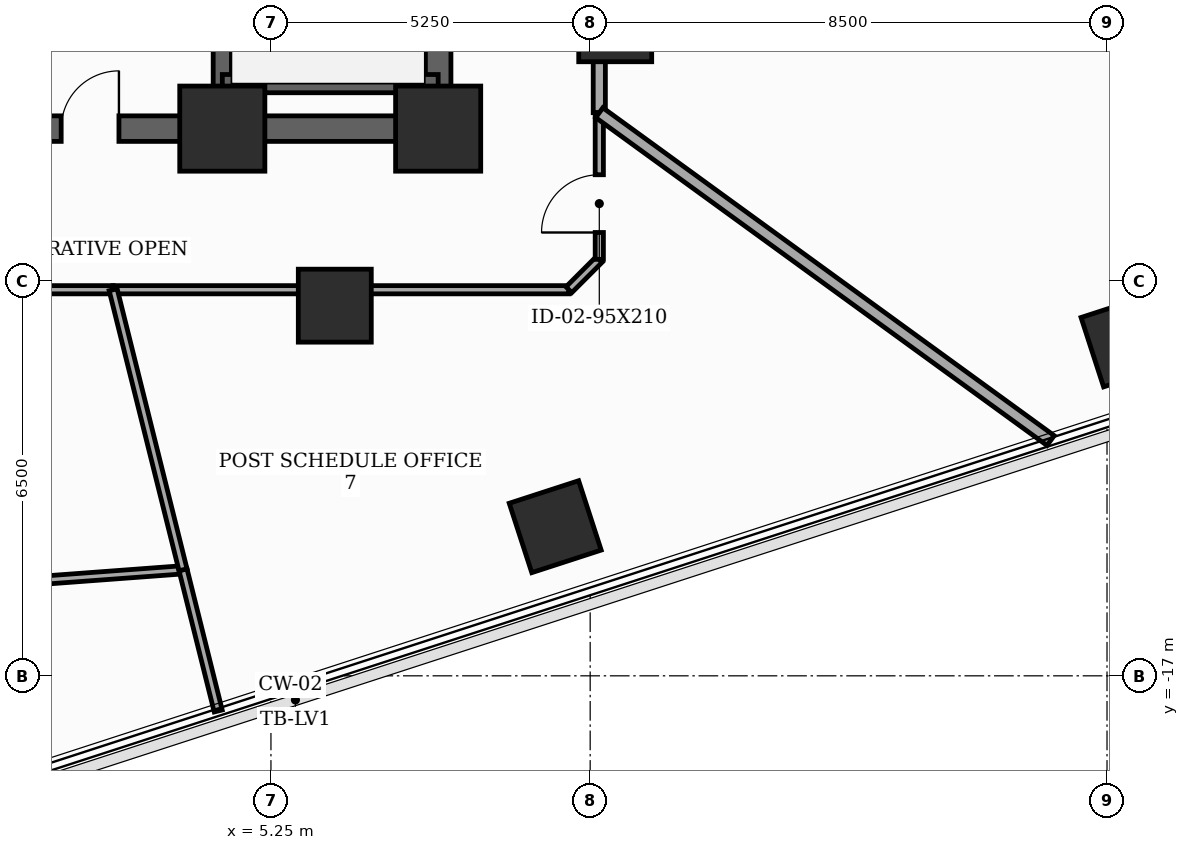
"""IFC4 building model, lengths in metres.
Left out: names, types, materials, properties, quantities, classifications, styles, units other than length and angle.
Written with IfcOpenShell. Run it as: python <this file> out.ifc"""

import sys

from ifc_helpers import new_model, si_unit, direction, frame, frame_2d, origin, origin_2d, place, context, subcontext, project, spatial, rectangle, extrude, element, fill, save


model = new_model("IFC4")
c1 = context("Model", 3, precision=1e-05, world=origin(), true_north=direction((0.0, 1.0)))
c2 = subcontext(c1, "Body", "Model", "MODEL_VIEW")
j1 = project(units=[si_unit("LENGTHUNIT", "METRE"), si_unit("PLANEANGLEUNIT", "RADIAN")], contexts=[c1])
p1 = place(None, origin())
s1 = spatial("IfcSite", under=j1, at=p1, CompositionType="ELEMENT")
p2 = place(p1, origin())
s2 = spatial("IfcBuilding", under=s1, at=p2, CompositionType="ELEMENT")
p3 = place(p2, frame((0.0, 0.0, 97.7)))
s3 = spatial("IfcBuildingStorey", under=s2, at=p3, CompositionType="ELEMENT", Elevation=97.7)
for number, where, z_axis, x_axis in (
    (1, (4.45, -8.0, 0.0), (0.0, 0.0, 1.0), (1.0, 0.0, 0.0)),
    (2, (8.0, -8.0, 0.0), (0.0, 0.0, 1.0), (1.0, 0.0, 0.0)),
):
    element("IfcColumn", number, at=place(p3, frame(where, z_axis=z_axis, x_axis=x_axis)), inside=s3, PredefinedType="COLUMN", context=c2, shape_type="SweptSolid", body=[
        extrude(rectangle(XDim=1.4, YDim=1.4, at=origin_2d()), origin(), (0.0, 0.0, 1.0), 3.7),
    ])
for number, where, z_axis, x_axis in (
    (3, (6.3, -10.912, 0.0), (0.0, 0.0, 1.0), (1.0, 0.0, 0.0)),
    (4, (10.912, -6.3, 0.0), (0.0, 0.0, 1.0), (1.0, 0.0, 0.0)),
    (5, (9.925, -14.547, 0.0), (0.0, 0.0, 1.0), (0.951, 0.309, 0.0)),
    (6, (19.329, -11.491, 0.0), (0.0, 0.0, 1.0), (0.951, 0.309, 0.0)),
):
    element("IfcColumn", number, at=place(p3, frame(where, z_axis=z_axis, x_axis=x_axis)), inside=s3, PredefinedType="COLUMN", context=c2, shape_type="SweptSolid", body=[
        extrude(rectangle(XDim=1.2, YDim=1.2, at=origin_2d()), origin(), (0.0, 0.0, 1.0), 3.7),
    ])
p4 = place(p3, frame((8.0, -8.0, 0.0), z_axis=(0.0, 0.0, 1.0), x_axis=(0.0, 1.0, 0.0)))
e7 = element("IfcWall", 7, at=p4, inside=s3, PredefinedType="SHEAR", context=c2, shape_type="SweptSolid", body=[
    extrude(rectangle(XDim=16.0, YDim=0.42, at=frame_2d((8.0, 0.0))), origin(), (0.0, 0.0, 1.0), 3.5),
])
p5 = place(p4, frame((9.6, 0.0, 0.0)))
e8 = element("IfcOpeningElement", 8, at=p5, cuts=e7, PredefinedType="OPENING", context=c2, shape_type="SweptSolid", body=[
    extrude(rectangle(XDim=1.05, YDim=2.15, at=frame_2d((0.525, 1.075))), frame((0.0, 0.22, 0.0), z_axis=(0.0, -1.0, 0.0), x_axis=(1.0, 0.0, 0.0)), (0.0, 0.0, 1.0), 0.44),
])
p6 = place(p4, frame((14.229, 0.0, 0.0)))
e9 = element("IfcOpeningElement", 9, at=p6, cuts=e7, PredefinedType="OPENING", context=c2, shape_type="SweptSolid", body=[
    extrude(rectangle(XDim=0.85, YDim=2.02, at=frame_2d((0.425, 1.01))), frame((0.0, 0.22, 0.0), z_axis=(0.0, -1.0, 0.0), x_axis=(1.0, 0.0, 0.0)), (0.0, 0.0, 1.0), 0.44),
])
p7 = place(p3, frame((-8.0, -8.0, 0.0), z_axis=(0.0, 0.0, 1.0), x_axis=(1.0, 0.0, 0.0)))
e10 = element("IfcWall", 10, at=p7, inside=s3, PredefinedType="SHEAR", context=c2, shape_type="SweptSolid", body=[
    extrude(rectangle(XDim=16.0, YDim=0.42, at=frame_2d((8.0, 0.0))), origin(), (0.0, 0.0, 1.0), 3.5),
])
p8 = place(p7, frame((5.2, 0.0, 0.0)))
e11 = element("IfcOpeningElement", 11, at=p8, cuts=e10, PredefinedType="OPENING", context=c2, shape_type="SweptSolid", body=[
    extrude(rectangle(XDim=0.95, YDim=2.1, at=frame_2d((0.475, 1.05))), frame((0.0, 0.22, 0.0), z_axis=(0.0, -1.0, 0.0), x_axis=(1.0, 0.0, 0.0)), (0.0, 0.0, 1.0), 0.44),
])
p9 = place(p7, frame((9.8, 0.0, 0.0)))
e12 = element("IfcOpeningElement", 12, at=p9, cuts=e10, PredefinedType="OPENING", context=c2, shape_type="SweptSolid", body=[
    extrude(rectangle(XDim=0.95, YDim=2.1, at=frame_2d((0.475, 1.05))), frame((0.0, 0.22, 0.0), z_axis=(0.0, -1.0, 0.0), x_axis=(1.0, 0.0, 0.0)), (0.0, 0.0, 1.0), 0.44),
])
p10 = place(p3, frame((4.45, -7.79, 0.0), z_axis=(0.0, 0.0, 1.0), x_axis=(0.0, 1.0, 0.0)))
e13 = element("IfcWall", 13, at=p10, inside=s3, PredefinedType="SHEAR", context=c2, shape_type="SweptSolid", body=[
    extrude(rectangle(XDim=15.58, YDim=0.3, at=frame_2d((7.79, 0.0))), origin(), (0.0, 0.0, 1.0), 3.5),
])
p11 = place(p3, frame((4.45, -7.26, 0.0), z_axis=(0.0, 0.0, 1.0), x_axis=(1.0, 0.0, 0.0)))
e14 = element("IfcWall", 14, at=p11, inside=s3, PredefinedType="SHEAR", context=c2, shape_type="SweptSolid", body=[
    extrude(rectangle(XDim=3.55, YDim=0.3, at=frame_2d((1.775, 0.0))), origin(), (0.0, 0.0, 1.0), 3.5),
])
p12 = place(p3, frame((10.65, -7.738, 0.0), z_axis=(0.0, 0.0, 1.0), x_axis=(0.0, 1.0, 0.0)))
e15 = element("IfcWall", 15, at=p12, inside=s3, PredefinedType="SOLIDWALL", context=c2, shape_type="SweptSolid", body=[
    extrude(rectangle(XDim=3.746, YDim=0.2, at=frame_2d((1.873, 0.0))), origin(), (0.0, 0.0, 1.0), 2.785),
])
p13 = place(p3, frame((10.65, -3.992, 0.0), z_axis=(0.0, 0.0, 1.0), x_axis=(0.965906888357, -0.258889712088, 0.0)))
e16 = element("IfcWall", 16, at=p13, inside=s3, PredefinedType="SOLIDWALL", context=c2, shape_type="SweptSolid", body=[
    extrude(rectangle(XDim=11.28, YDim=0.2, at=frame_2d((5.64, 0.0))), origin(), (0.0, 0.0, 1.0), 2.785),
])
p14 = place(p3, frame((-1.715, -10.65, 0.0), z_axis=(0.0, 0.0, 1.0), x_axis=(1.0, 0.0, 0.0)))
e17 = element("IfcWall", 17, at=p14, inside=s3, PredefinedType="PARTITIONING", context=c2, shape_type="SweptSolid", body=[
    extrude(rectangle(XDim=4.37, YDim=0.135, at=frame_2d((2.185, 0.0))), origin(), (0.0, 0.0, 1.0), 2.785),
])
p15 = place(p3, frame((2.655, -10.65, 0.0), z_axis=(0.0, 0.0, 1.0), x_axis=(1.0, 0.0, 0.0)))
e18 = element("IfcWall", 18, at=p15, inside=s3, PredefinedType="PARTITIONING", context=c2, shape_type="SweptSolid", body=[
    extrude(rectangle(XDim=7.495, YDim=0.135, at=frame_2d((3.748, 0.0))), origin(), (0.0, 0.0, 1.0), 2.785),
])
p16 = place(p3, frame((10.15, -10.65, 0.0), z_axis=(0.0, 0.0, 1.0), x_axis=(0.707106781187, 0.707106781187, 0.0)))
e19 = element("IfcWall", 19, at=p16, inside=s3, PredefinedType="PARTITIONING", context=c2, shape_type="SweptSolid", body=[
    extrude(rectangle(XDim=0.707, YDim=0.135, at=frame_2d((0.354, 0.0))), origin(), (0.0, 0.0, 1.0), 3.5),
])
p17 = place(p3, frame((10.65, -10.15, 0.0), z_axis=(0.0, 0.0, 1.0), x_axis=(0.0, 1.0, 0.0)))
e20 = element("IfcWall", 20, at=p17, inside=s3, PredefinedType="PARTITIONING", context=c2, shape_type="SweptSolid", body=[
    extrude(rectangle(XDim=2.412, YDim=0.135, at=frame_2d((1.206, 0.0))), origin(), (0.0, 0.0, 1.0), 3.5),
])
p18 = place(p17, frame((0.442, 0.0, 0.0)))
e21 = element("IfcOpeningElement", 21, at=p18, cuts=e20, PredefinedType="OPENING", context=c2, shape_type="SweptSolid", body=[
    extrude(rectangle(XDim=0.95, YDim=2.1, at=frame_2d((0.475, 1.05))), frame((0.0, 0.077, 0.0), z_axis=(0.0, -1.0, 0.0), x_axis=(1.0, 0.0, 0.0)), (0.0, 0.0, 1.0), 0.155),
])
p19 = place(p3, frame((10.65, -7.738, 0.0), z_axis=(0.0, 0.0, 1.0), x_axis=(0.809037487075, -0.587757045477, 0.0)))
e22 = element("IfcWall", 22, at=p19, inside=s3, PredefinedType="SOLIDWALL", context=c2, shape_type="SweptSolid", body=[
    extrude(rectangle(XDim=9.174, YDim=0.2, at=frame_2d((4.587, 0.0))), origin(), (0.0, 0.0, 1.0), 2.935),
])
p20 = place(p3, frame((3.804, -15.256, 0.0), z_axis=(0.0, 0.0, 1.0), x_axis=(-0.99725056907, -0.07410332307, 0.0)))
e23 = element("IfcWall", 23, at=p20, inside=s3, PredefinedType="PARTITIONING", context=c2, shape_type="SweptSolid", body=[
    extrude(rectangle(XDim=5.746, YDim=0.135, at=frame_2d((2.873, 0.0))), origin(), (0.0, 0.0, 1.0), 2.785),
])
p21 = place(p3, frame((4.383, -17.578, 0.0), z_axis=(0.0, 0.0, 1.0), x_axis=(-0.241887449135, 0.970304314095, 0.0)))
e24 = element("IfcWall", 24, at=p21, inside=s3, PredefinedType="PARTITIONING", context=c2, shape_type="SweptSolid", body=[
    extrude(rectangle(XDim=2.393, YDim=0.135, at=frame_2d((1.197, 0.0))), origin(), (0.0, 0.0, 1.0), 2.935),
])
p22 = place(p3, frame((3.804, -15.256, 0.0), z_axis=(0.0, 0.0, 1.0), x_axis=(-0.24201527033, 0.970272440569, 0.0)))
e25 = element("IfcWall", 25, at=p22, inside=s3, PredefinedType="PARTITIONING", context=c2, shape_type="SweptSolid", body=[
    extrude(rectangle(XDim=4.747, YDim=0.135, at=frame_2d((2.374, 0.0))), origin(), (0.0, 0.0, 1.0), 2.785),
])
p23 = place(p9, origin())
e26 = element("IfcDoor", 26, at=p23, inside=s3, OperationType="SINGLE_SWING_RIGHT", PredefinedType="DOOR", context=c2, shape_type="SweptSolid", body=[
    extrude(rectangle(XDim=0.95, YDim=2.1, at=frame_2d((0.475, 1.05))), frame((0.0, 0.025, 0.0), z_axis=(0.0, -1.0, 0.0), x_axis=(1.0, 0.0, 0.0)), (0.0, 0.0, 1.0), 0.05),
])
fill(e12, e26)
p24 = place(p18, origin())
e27 = element("IfcDoor", 27, at=p24, inside=s3, OperationType="SINGLE_SWING_LEFT", PredefinedType="DOOR", context=c2, shape_type="SweptSolid", body=[
    extrude(rectangle(XDim=0.95, YDim=2.1, at=frame_2d((0.475, 1.05))), frame((0.0, 0.025, 0.0), z_axis=(0.0, -1.0, 0.0), x_axis=(1.0, 0.0, 0.0)), (0.0, 0.0, 1.0), 0.05),
])
fill(e21, e27)
save(model, sys.argv[1])
